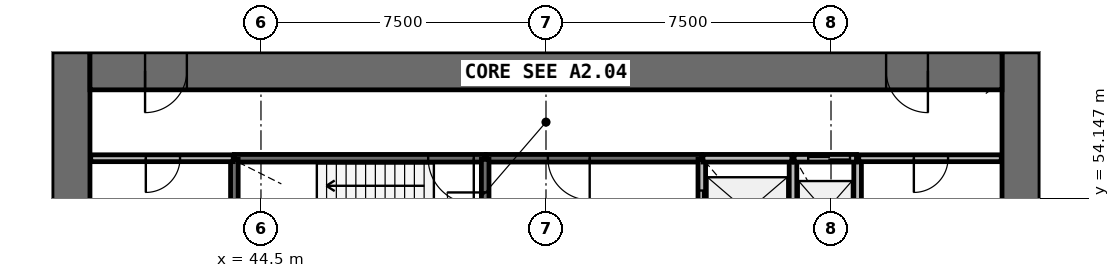
"""IFC4 building model, lengths in metres.
Left out: names, types, materials, properties, quantities, classifications, styles, units other than length and angle.
Written with IfcOpenShell. Run it as: python <this file> out.ifc"""

import sys

from ifc_helpers import new_model, si_unit, direction, frame, frame_2d, origin, place, context, subcontext, project, spatial, rectangle, extrude, source, transform, mapped, element, fill, save


model = new_model("IFC4")
c1 = context("Model", 3, precision=1e-05, world=origin(), true_north=direction((0.0, 1.0)))
c2 = subcontext(c1, "Body", "Model", "MODEL_VIEW")
j1 = project(units=[si_unit("LENGTHUNIT", "METRE"), si_unit("PLANEANGLEUNIT", "RADIAN")], contexts=[c1])
p1 = place(None, origin())
s1 = spatial("IfcSite", under=j1, at=p1, CompositionType="ELEMENT")
p2 = place(p1, origin())
s2 = spatial("IfcBuilding", under=s1, at=p2, CompositionType="ELEMENT")
p3 = place(p2, frame((0.0, 0.0, 13.8)))
s3 = spatial("IfcBuildingStorey", under=s2, at=p3, CompositionType="ELEMENT", Elevation=13.8)
p4 = place(p3, frame((64.5, 38.0, 0.0), z_axis=(0.0, 0.0, 1.0), x_axis=(0.0, 1.0, 0.0)))
e1 = element("IfcWall", 1, at=p4, inside=s3, PredefinedType="SHEAR", context=c2, shape_type="SweptSolid", body=[
    extrude(rectangle(XDim=20.0, YDim=1.0, at=frame_2d((10.0, 0.0))), origin(), (0.0, 0.0, 1.0), 4.4),
])
p5 = place(p4, frame((9.1, 0.0, 0.0)))
e2 = element("IfcOpeningElement", 2, at=p5, cuts=e1, PredefinedType="OPENING", context=c2, shape_type="SweptSolid", body=[
    extrude(rectangle(XDim=1.8, YDim=2.1, at=frame_2d((0.9, 1.05))), frame((0.0, 0.51, 0.0), z_axis=(0.0, -1.0, 0.0), x_axis=(1.0, 0.0, 0.0)), (0.0, 0.0, 1.0), 1.02),
])
p6 = place(p3, frame((39.5, 58.0, 0.0), z_axis=(0.0, 0.0, 1.0), x_axis=(0.0, -1.0, 0.0)))
e3 = element("IfcWall", 3, at=p6, inside=s3, PredefinedType="SHEAR", context=c2, shape_type="SweptSolid", body=[
    extrude(rectangle(XDim=20.0, YDim=1.0, at=frame_2d((10.0, 0.0))), origin(), (0.0, 0.0, 1.0), 4.4),
])
p7 = place(p6, frame((9.1, 0.0, 0.0)))
e4 = element("IfcOpeningElement", 4, at=p7, cuts=e3, PredefinedType="OPENING", context=c2, shape_type="SweptSolid", body=[
    extrude(rectangle(XDim=1.8, YDim=2.1, at=frame_2d((0.9, 1.05))), frame((0.0, 0.51, 0.0), z_axis=(0.0, -1.0, 0.0), x_axis=(1.0, 0.0, 0.0)), (0.0, 0.0, 1.0), 1.02),
])
p8 = place(p3, frame((64.0, 57.5, 0.0), z_axis=(0.0, 0.0, 1.0), x_axis=(-1.0, 0.0, 0.0)))
e5 = element("IfcWall", 5, at=p8, inside=s3, PredefinedType="SHEAR", context=c2, shape_type="SweptSolid", body=[
    extrude(rectangle(XDim=24.0, YDim=1.0, at=frame_2d((12.0, 0.0))), origin(), (0.0, 0.0, 1.0), 4.4),
])
p9 = place(p8, frame((21.45, 0.0, 0.0)))
e6 = element("IfcOpeningElement", 6, at=p9, cuts=e5, PredefinedType="OPENING", context=c2, shape_type="SweptSolid", body=[
    extrude(rectangle(XDim=1.1, YDim=2.1, at=frame_2d((0.55, 1.05))), frame((0.0, 0.51, 0.0), z_axis=(0.0, -1.0, 0.0), x_axis=(1.0, 0.0, 0.0)), (0.0, 0.0, 1.0), 1.02),
])
p10 = place(p8, frame((1.95, 0.0, 0.0)))
e7 = element("IfcOpeningElement", 7, at=p10, cuts=e5, PredefinedType="OPENING", context=c2, shape_type="SweptSolid", body=[
    extrude(rectangle(XDim=1.1, YDim=2.1, at=frame_2d((0.55, 1.05))), frame((0.0, 0.51, 0.0), z_axis=(0.0, -1.0, 0.0), x_axis=(1.0, 0.0, 0.0)), (0.0, 0.0, 1.0), 1.02),
])
p11 = place(p3, frame((50.4, 55.2, 0.0), z_axis=(0.0, 0.0, 1.0), x_axis=(-1.0, 0.0, 0.0)))
e8 = element("IfcWall", 8, at=p11, inside=s3, PredefinedType="SOLIDWALL", context=c2, shape_type="SweptSolid", body=[
    extrude(rectangle(XDim=6.6, YDim=0.2, at=frame_2d((3.3, 0.0))), origin(), (0.0, 0.0, 1.0), 4.05),
])
p12 = place(p11, frame((0.3, 0.0, 0.0)))
e9 = element("IfcOpeningElement", 9, at=p12, cuts=e8, PredefinedType="OPENING", context=c2, shape_type="SweptSolid", body=[
    extrude(rectangle(XDim=1.2, YDim=2.1, at=frame_2d((0.6, 1.05))), frame((0.0, 0.11, 0.0), z_axis=(0.0, -1.0, 0.0), x_axis=(1.0, 0.0, 0.0)), (0.0, 0.0, 1.0), 0.22),
])
p13 = place(p3, frame((56.1, 55.2, 0.0), z_axis=(0.0, 0.0, 1.0), x_axis=(-1.0, 0.0, 0.0)))
e10 = element("IfcWall", 10, at=p13, inside=s3, PredefinedType="SOLIDWALL", context=c2, shape_type="SweptSolid", body=[
    extrude(rectangle(XDim=5.67, YDim=0.2, at=frame_2d((2.835, 0.0))), origin(), (0.0, 0.0, 1.0), 4.05),
])
p14 = place(p13, frame((2.95, 0.0, 0.0)))
e11 = element("IfcOpeningElement", 11, at=p14, cuts=e10, PredefinedType="OPENING", context=c2, shape_type="SweptSolid", body=[
    extrude(rectangle(XDim=1.1, YDim=2.1, at=frame_2d((0.55, 1.05))), frame((0.0, 0.11, 0.0), z_axis=(0.0, -1.0, 0.0), x_axis=(1.0, 0.0, 0.0)), (0.0, 0.0, 1.0), 0.22),
])
p15 = place(p3, frame((50.4, 52.4, 0.0), z_axis=(0.0, 0.0, 1.0), x_axis=(0.0, 1.0, 0.0)))
e12 = element("IfcWall", 12, at=p15, inside=s3, PredefinedType="SOLIDWALL", context=c2, shape_type="SweptSolid", body=[
    extrude(rectangle(XDim=2.77, YDim=0.2, at=frame_2d((1.385, 0.0))), origin(), (0.0, 0.0, 1.0), 4.05),
])
p16 = place(p15, frame((0.9, 0.0, 0.0)))
e13 = element("IfcOpeningElement", 13, at=p16, cuts=e12, PredefinedType="OPENING", context=c2, shape_type="SweptSolid", body=[
    extrude(rectangle(XDim=1.0, YDim=2.1, at=frame_2d((0.5, 1.05))), frame((0.0, 0.11, 0.0), z_axis=(0.0, -1.0, 0.0), x_axis=(1.0, 0.0, 0.0)), (0.0, 0.0, 1.0), 0.22),
])
p17 = place(p3, frame((56.1, 55.17, 0.0), z_axis=(0.0, 0.0, 1.0), x_axis=(0.0, -1.0, 0.0)))
e14 = element("IfcWall", 14, at=p17, inside=s3, PredefinedType="SOLIDWALL", context=c2, shape_type="SweptSolid", body=[
    extrude(rectangle(XDim=2.77, YDim=0.2, at=frame_2d((1.385, 0.0))), origin(), (0.0, 0.0, 1.0), 4.05),
])
p18 = place(p17, frame((0.82, 0.0, 0.0)))
e15 = element("IfcOpeningElement", 15, at=p18, cuts=e14, PredefinedType="OPENING", context=c2, shape_type="SweptSolid", body=[
    extrude(rectangle(XDim=1.1, YDim=2.1, at=frame_2d((0.55, 1.05))), frame((0.0, 0.11, 0.0), z_axis=(0.0, -1.0, 0.0), x_axis=(1.0, 0.0, 0.0)), (0.0, 0.0, 1.0), 0.22),
])
for number, where, z_axis, x_axis in (
    (16, (58.5, 52.4, 0.0), (0.0, 0.0, 1.0), (0.0, 1.0, 0.0)),
    (17, (60.2, 52.4, 0.0), (0.0, 0.0, 1.0), (0.0, 1.0, 0.0)),
):
    element("IfcWall", number, at=place(p3, frame(where, z_axis=z_axis, x_axis=x_axis)), inside=s3, PredefinedType="SOLIDWALL", context=c2, shape_type="SweptSolid", body=[
        extrude(rectangle(XDim=2.8, YDim=0.2, at=frame_2d((1.4, 0.0))), origin(), (0.0, 0.0, 1.0), 4.05),
    ])
p19 = place(p3, frame((58.47, 55.2, 0.0), z_axis=(0.0, 0.0, 1.0), x_axis=(-1.0, 0.0, 0.0)))
e18 = element("IfcWall", 18, at=p19, inside=s3, PredefinedType="SOLIDWALL", context=c2, shape_type="SweptSolid", body=[
    extrude(rectangle(XDim=2.34, YDim=0.2, at=frame_2d((1.17, 0.0))), origin(), (0.0, 0.0, 1.0), 4.05),
])
p20 = place(p3, frame((43.8, 55.17, 0.0), z_axis=(0.0, 0.0, 1.0), x_axis=(0.0, -1.0, 0.0)))
e19 = element("IfcWall", 19, at=p20, inside=s3, PredefinedType="SOLIDWALL", context=c2, shape_type="SweptSolid", body=[
    extrude(rectangle(XDim=2.14, YDim=0.2, at=frame_2d((1.07, 0.0))), origin(), (0.0, 0.0, 1.0), 4.05),
])
p21 = place(p3, frame((60.17, 55.2, 0.0), z_axis=(0.0, 0.0, 1.0), x_axis=(-1.0, 0.0, 0.0)))
e20 = element("IfcWall", 20, at=p21, inside=s3, PredefinedType="SOLIDWALL", context=c2, shape_type="SweptSolid", body=[
    extrude(rectangle(XDim=1.64, YDim=0.2, at=frame_2d((0.82, 0.0))), origin(), (0.0, 0.0, 1.0), 4.05),
])
p22 = place(p21, frame((0.17, 0.0, 0.0)))
e21 = element("IfcOpeningElement", 21, at=p22, cuts=e20, PredefinedType="OPENING", context=c2, shape_type="SweptSolid", body=[
    extrude(rectangle(XDim=1.1, YDim=2.1, at=frame_2d((0.55, 1.05))), frame((0.0, 0.11, 0.0), z_axis=(0.0, -1.0, 0.0), x_axis=(1.0, 0.0, 0.0)), (0.0, 0.0, 1.0), 0.22),
])
p23 = place(p3, frame((43.77, 55.2, 0.0), z_axis=(0.0, 0.0, 1.0), x_axis=(-1.0, 0.0, 0.0)))
e22 = element("IfcWall", 22, at=p23, inside=s3, PredefinedType="PARTITIONING", context=c2, shape_type="SweptSolid", body=[
    extrude(rectangle(XDim=3.75, YDim=0.18, at=frame_2d((1.875, 0.0))), origin(), (0.0, 0.0, 1.0), 4.05),
])
p24 = place(p23, frame((1.4, 0.0, 0.0)))
e23 = element("IfcOpeningElement", 23, at=p24, cuts=e22, PredefinedType="OPENING", context=c2, shape_type="SweptSolid", body=[
    extrude(rectangle(XDim=0.9, YDim=2.1, at=frame_2d((0.45, 1.05))), frame((0.0, 0.1, 0.0), z_axis=(0.0, -1.0, 0.0), x_axis=(1.0, 0.0, 0.0)), (0.0, 0.0, 1.0), 0.2),
])
p25 = place(p3, frame((63.98, 55.2, 0.0), z_axis=(0.0, 0.0, 1.0), x_axis=(-1.0, 0.0, 0.0)))
e24 = element("IfcWall", 24, at=p25, inside=s3, PredefinedType="PARTITIONING", context=c2, shape_type="SweptSolid", body=[
    extrude(rectangle(XDim=3.75, YDim=0.18, at=frame_2d((1.875, 0.0))), origin(), (0.0, 0.0, 1.0), 4.05),
])
p26 = place(p25, frame((1.4, 0.0, 0.0)))
e25 = element("IfcOpeningElement", 25, at=p26, cuts=e24, PredefinedType="OPENING", context=c2, shape_type="SweptSolid", body=[
    extrude(rectangle(XDim=0.9, YDim=2.1, at=frame_2d((0.45, 1.05))), frame((0.0, 0.1, 0.0), z_axis=(0.0, -1.0, 0.0), x_axis=(1.0, 0.0, 0.0)), (0.0, 0.0, 1.0), 0.2),
])
m1 = source(origin(), c2, "Body", "SweptSolid", [
    extrude(rectangle(XDim=1.1, YDim=2.1, at=frame_2d((0.55, 1.05))), frame((0.0, 0.025, 0.0), z_axis=(0.0, -1.0, 0.0), x_axis=(1.0, 0.0, 0.0)), (0.0, 0.0, 1.0), 0.05),
])
p27 = place(p18, origin())
e26 = element("IfcDoor", 26, at=p27, inside=s3, OperationType="DOUBLE_DOOR_SLIDING", PredefinedType="USERDEFINED", context=c2, shape_type="MappedRepresentation", body=[
    mapped(m1, transform((0.0, 0.0, 0.0), scale=1.0)),
])
fill(e15, e26)
p28 = place(p22, origin())
e27 = element("IfcDoor", 27, at=p28, inside=s3, OperationType="DOUBLE_DOOR_SLIDING", PredefinedType="USERDEFINED", context=c2, shape_type="MappedRepresentation", body=[
    mapped(m1, transform((0.0, 0.0, 0.0), scale=1.0)),
])
fill(e21, e27)
m2 = source(origin(), c2, "Body", "SweptSolid", [
    extrude(rectangle(XDim=1.2, YDim=2.1, at=frame_2d((0.6, 1.05))), frame((0.0, 0.025, 0.0), z_axis=(0.0, -1.0, 0.0), x_axis=(1.0, 0.0, 0.0)), (0.0, 0.0, 1.0), 0.05),
])
p29 = place(p12, origin())
e28 = element("IfcDoor", 28, at=p29, inside=s3, OperationType="SINGLE_SWING_LEFT", PredefinedType="DOOR", context=c2, shape_type="MappedRepresentation", body=[
    mapped(m2, transform((0.0, 0.0, 0.0), scale=1.0)),
])
fill(e9, e28)
m3 = source(origin(), c2, "Body", "SweptSolid", [
    extrude(rectangle(XDim=1.0, YDim=2.1, at=frame_2d((0.5, 1.05))), frame((0.0, 0.025, 0.0), z_axis=(0.0, -1.0, 0.0), x_axis=(1.0, 0.0, 0.0)), (0.0, 0.0, 1.0), 0.05),
])
p30 = place(p16, origin())
e29 = element("IfcDoor", 29, at=p30, inside=s3, OperationType="SINGLE_SWING_RIGHT", PredefinedType="DOOR", context=c2, shape_type="MappedRepresentation", body=[
    mapped(m3, transform((0.0, 0.0, 0.0), scale=1.0)),
])
fill(e13, e29)
m4 = source(origin(), c2, "Body", "SweptSolid", [
    extrude(rectangle(XDim=1.1, YDim=2.1, at=frame_2d((0.55, 1.05))), frame((0.0, 0.025, 0.0), z_axis=(0.0, -1.0, 0.0), x_axis=(1.0, 0.0, 0.0)), (0.0, 0.0, 1.0), 0.05),
])
p31 = place(p14, origin())
e30 = element("IfcDoor", 30, at=p31, inside=s3, OperationType="SINGLE_SWING_LEFT", PredefinedType="DOOR", context=c2, shape_type="MappedRepresentation", body=[
    mapped(m4, transform((0.0, 0.0, 0.0), scale=1.0)),
])
fill(e11, e30)
m5 = source(origin(), c2, "Body", "SweptSolid", [
    extrude(rectangle(XDim=1.1, YDim=2.1, at=frame_2d((0.55, 1.05))), frame((0.0, 0.025, 0.0), z_axis=(0.0, -1.0, 0.0), x_axis=(1.0, 0.0, 0.0)), (0.0, 0.0, 1.0), 0.05),
])
p32 = place(p9, origin())
e31 = element("IfcDoor", 31, at=p32, inside=s3, OperationType="SINGLE_SWING_RIGHT", PredefinedType="DOOR", context=c2, shape_type="MappedRepresentation", body=[
    mapped(m5, transform((0.0, 0.0, 0.0), scale=1.0)),
])
fill(e6, e31)
p33 = place(p10, origin())
e32 = element("IfcDoor", 32, at=p33, inside=s3, OperationType="SINGLE_SWING_LEFT", PredefinedType="DOOR", context=c2, shape_type="MappedRepresentation", body=[
    mapped(m5, transform((0.0, 0.0, 0.0), scale=1.0)),
])
fill(e7, e32)
m6 = source(origin(), c2, "Body", "SweptSolid", [
    extrude(rectangle(XDim=0.9, YDim=2.1, at=frame_2d((0.45, 1.05))), frame((0.0, 0.025, 0.0), z_axis=(0.0, -1.0, 0.0), x_axis=(1.0, 0.0, 0.0)), (0.0, 0.0, 1.0), 0.05),
])
p34 = place(p24, origin())
e33 = element("IfcDoor", 33, at=p34, inside=s3, OperationType="SINGLE_SWING_RIGHT", PredefinedType="DOOR", context=c2, shape_type="MappedRepresentation", body=[
    mapped(m6, transform((0.0, 0.0, 0.0), scale=1.0)),
])
fill(e23, e33)
p35 = place(p26, origin())
e34 = element("IfcDoor", 34, at=p35, inside=s3, OperationType="SINGLE_SWING_RIGHT", PredefinedType="DOOR", context=c2, shape_type="MappedRepresentation", body=[
    mapped(m6, transform((0.0, 0.0, 0.0), scale=1.0)),
])
fill(e25, e34)
save(model, sys.argv[1])
